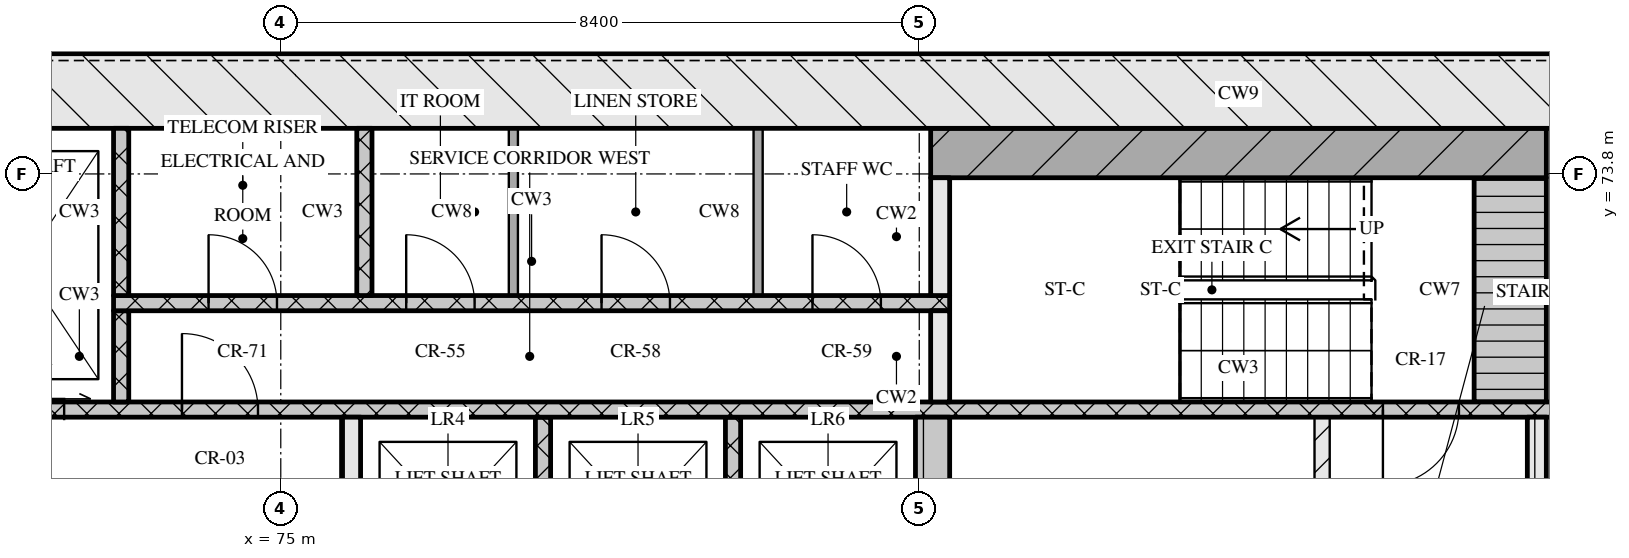
"""IFC4 building model, lengths in metres.
Left out: names, types, materials, properties, quantities, classifications, styles, units other than length and angle.
Written with IfcOpenShell. Run it as: python <this file> out.ifc"""

import sys

from ifc_helpers import new_model, si_unit, direction, frame, frame_2d, origin, place, context, subcontext, project, spatial, rectangle, extrude, element, fill, save


model = new_model("IFC4")
c1 = context("Model", 3, precision=1e-05, world=origin(), true_north=direction((0.0, 1.0)))
c2 = subcontext(c1, "Body", "Model", "MODEL_VIEW")
j1 = project(units=[si_unit("LENGTHUNIT", "METRE"), si_unit("PLANEANGLEUNIT", "RADIAN")], contexts=[c1])
p1 = place(None, origin())
s1 = spatial("IfcSite", under=j1, at=p1, CompositionType="ELEMENT")
p2 = place(p1, origin())
s2 = spatial("IfcBuilding", under=s1, at=p2, CompositionType="ELEMENT")
p3 = place(p2, frame((0.0, 0.0, 138.45)))
s3 = spatial("IfcBuildingStorey", under=s2, at=p3, CompositionType="ELEMENT", Elevation=138.45)
p4 = place(p3, frame((66.8, 74.9, 0.0), z_axis=(0.0, 0.0, 1.0), x_axis=(1.0, 0.0, 0.0)))
e1 = element("IfcWall", 1, at=p4, inside=s3, PredefinedType="SOLIDWALL", context=c2, shape_type="SweptSolid", body=[
    extrude(rectangle(XDim=41.6, YDim=1.0, at=frame_2d((20.8, 0.0))), origin(), (0.0, 0.0, 1.0), 3.3),
])
for number, where, z_axis, x_axis in (
    (2, (78.45, 68.0, 0.0), (0.0, 0.0, 1.0), (0.0, 1.0, 0.0)),
    (3, (80.95, 68.0, 0.0), (0.0, 0.0, 1.0), (0.0, 1.0, 0.0)),
):
    element("IfcWall", number, at=place(p3, frame(where, z_axis=z_axis, x_axis=x_axis)), inside=s3, PredefinedType="SOLIDWALL", context=c2, shape_type="SweptSolid", body=[
        extrude(rectangle(XDim=2.6, YDim=0.2, at=frame_2d((1.3, 0.0))), origin(), (0.0, 0.0, 1.0), 3.3),
    ])
p5 = place(p3, frame((83.575, 68.0, 0.0), z_axis=(0.0, 0.0, 1.0), x_axis=(0.0, 1.0, 0.0)))
e4 = element("IfcWall", 4, at=p5, inside=s3, PredefinedType="SOLIDWALL", context=c2, shape_type="SweptSolid", body=[
    extrude(rectangle(XDim=2.6, YDim=0.45, at=frame_2d((1.3, 0.0))), origin(), (0.0, 0.0, 1.0), 3.3),
])
p6 = place(p3, frame((88.7, 68.0, 0.0), z_axis=(0.0, 0.0, 1.0), x_axis=(0.0, 1.0, 0.0)))
e5 = element("IfcWall", 5, at=p6, inside=s3, PredefinedType="PARTITIONING", context=c2, shape_type="SweptSolid", body=[
    extrude(rectangle(XDim=2.6, YDim=0.2, at=frame_2d((1.3, 0.0))), origin(), (0.0, 0.0, 1.0), 3.3),
])
p7 = place(p3, frame((91.525, 68.0, 0.0), z_axis=(0.0, 0.0, 1.0), x_axis=(0.0, 1.0, 0.0)))
e6 = element("IfcWall", 6, at=p7, inside=s3, PredefinedType="SOLIDWALL", context=c2, shape_type="SweptSolid", body=[
    extrude(rectangle(XDim=2.6, YDim=0.25, at=frame_2d((1.3, 0.0))), origin(), (0.0, 0.0, 1.0), 3.3),
])
p8 = place(p3, frame((75.925, 68.3, 0.0), z_axis=(0.0, 0.0, 1.0), x_axis=(0.0, 1.0, 0.0)))
e7 = element("IfcWall", 7, at=p8, inside=s3, PredefinedType="SOLIDWALL", context=c2, shape_type="SweptSolid", body=[
    extrude(rectangle(XDim=2.3, YDim=0.25, at=frame_2d((1.15, 0.0))), origin(), (0.0, 0.0, 1.0), 3.3),
])
p9 = place(p3, frame((67.8, 70.7, 0.0), z_axis=(0.0, 0.0, 1.0), x_axis=(1.0, 0.0, 0.0)))
e8 = element("IfcWall", 8, at=p9, inside=s3, PredefinedType="SOLIDWALL", context=c2, shape_type="SweptSolid", body=[
    extrude(rectangle(XDim=39.6, YDim=0.2, at=frame_2d((19.8, 0.0))), origin(), (0.0, 0.0, 1.0), 3.3),
])
p10 = place(p9, frame((0.65, 0.0, 0.0)))
e9 = element("IfcOpeningElement", 9, at=p10, cuts=e8, PredefinedType="OPENING", context=c2, shape_type="SweptSolid", body=[
    extrude(rectangle(XDim=1.1, YDim=2.1, at=frame_2d((0.55, 1.05))), frame((0.0, 0.11, 0.0), z_axis=(0.0, -1.0, 0.0), x_axis=(1.0, 0.0, 0.0)), (0.0, 0.0, 1.0), 0.22),
])
p11 = place(p9, frame((3.25, 0.0, 0.0)))
e10 = element("IfcOpeningElement", 10, at=p11, cuts=e8, PredefinedType="OPENING", context=c2, shape_type="SweptSolid", body=[
    extrude(rectangle(XDim=1.1, YDim=2.1, at=frame_2d((0.55, 1.05))), frame((0.0, 0.11, 0.0), z_axis=(0.0, -1.0, 0.0), x_axis=(1.0, 0.0, 0.0)), (0.0, 0.0, 1.0), 0.22),
])
p12 = place(p9, frame((5.9, 0.0, 0.0)))
e11 = element("IfcOpeningElement", 11, at=p12, cuts=e8, PredefinedType="OPENING", context=c2, shape_type="SweptSolid", body=[
    extrude(rectangle(XDim=1.0, YDim=2.1, at=frame_2d((0.5, 1.05))), frame((0.0, 0.11, 0.0), z_axis=(0.0, -1.0, 0.0), x_axis=(1.0, 0.0, 0.0)), (0.0, 0.0, 1.0), 0.22),
])
p13 = place(p9, frame((21.7, 0.0, 0.0)))
e12 = element("IfcOpeningElement", 12, at=p13, cuts=e8, PredefinedType="OPENING", context=c2, shape_type="SweptSolid", body=[
    extrude(rectangle(XDim=1.0, YDim=2.1, at=frame_2d((0.5, 1.05))), frame((0.0, 0.11, 0.0), z_axis=(0.0, -1.0, 0.0), x_axis=(1.0, 0.0, 0.0)), (0.0, 0.0, 1.0), 0.22),
])
p14 = place(p9, frame((32.7, 0.0, 0.0)))
e13 = element("IfcOpeningElement", 13, at=p14, cuts=e8, PredefinedType="OPENING", context=c2, shape_type="SweptSolid", body=[
    extrude(rectangle(XDim=1.0, YDim=2.1, at=frame_2d((0.5, 1.05))), frame((0.0, 0.11, 0.0), z_axis=(0.0, -1.0, 0.0), x_axis=(1.0, 0.0, 0.0)), (0.0, 0.0, 1.0), 0.22),
])
p15 = place(p9, frame((35.25, 0.0, 0.0)))
e14 = element("IfcOpeningElement", 14, at=p15, cuts=e8, PredefinedType="OPENING", context=c2, shape_type="SweptSolid", body=[
    extrude(rectangle(XDim=1.1, YDim=2.1, at=frame_2d((0.55, 1.05))), frame((0.0, 0.11, 0.0), z_axis=(0.0, -1.0, 0.0), x_axis=(1.0, 0.0, 0.0)), (0.0, 0.0, 1.0), 0.22),
])
p16 = place(p9, frame((37.85, 0.0, 0.0)))
e15 = element("IfcOpeningElement", 15, at=p16, cuts=e8, PredefinedType="OPENING", context=c2, shape_type="SweptSolid", body=[
    extrude(rectangle(XDim=1.1, YDim=2.1, at=frame_2d((0.55, 1.05))), frame((0.0, 0.11, 0.0), z_axis=(0.0, -1.0, 0.0), x_axis=(1.0, 0.0, 0.0)), (0.0, 0.0, 1.0), 0.22),
])
p17 = place(p3, frame((72.9, 70.8, 0.0), z_axis=(0.0, 0.0, 1.0), x_axis=(0.0, 1.0, 0.0)))
e16 = element("IfcWall", 16, at=p17, inside=s3, PredefinedType="SOLIDWALL", context=c2, shape_type="SweptSolid", body=[
    extrude(rectangle(XDim=1.2, YDim=0.2, at=frame_2d((0.6, 0.0))), origin(), (0.0, 0.0, 1.0), 3.3),
])
p18 = place(p3, frame((83.675, 70.8, 0.0), z_axis=(0.0, 0.0, 1.0), x_axis=(0.0, 1.0, 0.0)))
e17 = element("IfcWall", 17, at=p18, inside=s3, PredefinedType="SOLIDWALL", context=c2, shape_type="SweptSolid", body=[
    extrude(rectangle(XDim=1.2, YDim=0.25, at=frame_2d((0.6, 0.0))), origin(), (0.0, 0.0, 1.0), 3.3),
])
p19 = place(p3, frame((91.175, 70.8, 0.0), z_axis=(0.0, 0.0, 1.0), x_axis=(0.0, 1.0, 0.0)))
e18 = element("IfcWall", 18, at=p19, inside=s3, PredefinedType="SOLIDWALL", context=c2, shape_type="SweptSolid", body=[
    extrude(rectangle(XDim=2.95, YDim=0.95, at=frame_2d((1.475, 0.0))), origin(), (0.0, 0.0, 1.0), 3.3),
])
p20 = place(p3, frame((72.8, 72.1, 0.0), z_axis=(0.0, 0.0, 1.0), x_axis=(1.0, 0.0, 0.0)))
e19 = element("IfcWall", 19, at=p20, inside=s3, PredefinedType="SOLIDWALL", context=c2, shape_type="SweptSolid", body=[
    extrude(rectangle(XDim=11.0, YDim=0.2, at=frame_2d((5.5, 0.0))), origin(), (0.0, 0.0, 1.0), 3.3),
])
p21 = place(p20, frame((1.25, 0.0, 0.0)))
e20 = element("IfcOpeningElement", 20, at=p21, cuts=e19, PredefinedType="OPENING", context=c2, shape_type="SweptSolid", body=[
    extrude(rectangle(XDim=0.9, YDim=2.1, at=frame_2d((0.45, 1.05))), frame((0.0, 0.11, 0.0), z_axis=(0.0, -1.0, 0.0), x_axis=(1.0, 0.0, 0.0)), (0.0, 0.0, 1.0), 0.22),
])
p22 = place(p20, frame((3.85, 0.0, 0.0)))
e21 = element("IfcOpeningElement", 21, at=p22, cuts=e19, PredefinedType="OPENING", context=c2, shape_type="SweptSolid", body=[
    extrude(rectangle(XDim=0.9, YDim=2.1, at=frame_2d((0.45, 1.05))), frame((0.0, 0.11, 0.0), z_axis=(0.0, -1.0, 0.0), x_axis=(1.0, 0.0, 0.0)), (0.0, 0.0, 1.0), 0.22),
])
p23 = place(p20, frame((6.42, 0.0, 0.0)))
e22 = element("IfcOpeningElement", 22, at=p23, cuts=e19, PredefinedType="OPENING", context=c2, shape_type="SweptSolid", body=[
    extrude(rectangle(XDim=0.9, YDim=2.1, at=frame_2d((0.45, 1.05))), frame((0.0, 0.11, 0.0), z_axis=(0.0, -1.0, 0.0), x_axis=(1.0, 0.0, 0.0)), (0.0, 0.0, 1.0), 0.22),
])
p24 = place(p20, frame((9.195, 0.0, 0.0)))
e23 = element("IfcOpeningElement", 23, at=p24, cuts=e19, PredefinedType="OPENING", context=c2, shape_type="SweptSolid", body=[
    extrude(rectangle(XDim=0.9, YDim=2.1, at=frame_2d((0.45, 1.05))), frame((0.0, 0.11, 0.0), z_axis=(0.0, -1.0, 0.0), x_axis=(1.0, 0.0, 0.0)), (0.0, 0.0, 1.0), 0.22),
])
for number, where, z_axis, x_axis in (
    (24, (72.9, 72.2, 0.0), (0.0, 0.0, 1.0), (0.0, 1.0, 0.0)),
    (25, (76.1, 72.2, 0.0), (0.0, 0.0, 1.0), (0.0, 1.0, 0.0)),
):
    element("IfcWall", number, at=place(p3, frame(where, z_axis=z_axis, x_axis=x_axis)), inside=s3, PredefinedType="SOLIDWALL", context=c2, shape_type="SweptSolid", body=[
        extrude(rectangle(XDim=2.2, YDim=0.2, at=frame_2d((1.1, 0.0))), origin(), (0.0, 0.0, 1.0), 3.3),
    ])
for number, where, z_axis, x_axis in (
    (26, (78.06, 72.2, 0.0), (0.0, 0.0, 1.0), (0.0, 1.0, 0.0)),
    (27, (81.28, 72.2, 0.0), (0.0, 0.0, 1.0), (0.0, 1.0, 0.0)),
):
    element("IfcWall", number, at=place(p3, frame(where, z_axis=z_axis, x_axis=x_axis)), inside=s3, PredefinedType="PARTITIONING", context=c2, shape_type="SweptSolid", body=[
        extrude(rectangle(XDim=2.2, YDim=0.12, at=frame_2d((1.1, 0.0))), origin(), (0.0, 0.0, 1.0), 3.3),
    ])
p25 = place(p3, frame((83.675, 72.2, 0.0), z_axis=(0.0, 0.0, 1.0), x_axis=(0.0, 1.0, 0.0)))
e28 = element("IfcWall", 28, at=p25, inside=s3, PredefinedType="SOLIDWALL", context=c2, shape_type="SweptSolid", body=[
    extrude(rectangle(XDim=1.55, YDim=0.25, at=frame_2d((0.775, 0.0))), origin(), (0.0, 0.0, 1.0), 3.3),
])
p26 = place(p3, frame((83.55, 74.075, 0.0), z_axis=(0.0, 0.0, 1.0), x_axis=(1.0, 0.0, 0.0)))
e29 = element("IfcWall", 29, at=p26, inside=s3, PredefinedType="SOLIDWALL", context=c2, shape_type="SweptSolid", body=[
    extrude(rectangle(XDim=8.1, YDim=0.65, at=frame_2d((4.05, 0.0))), origin(), (0.0, 0.0, 1.0), 3.3),
])
p27 = place(p11, origin())
e30 = element("IfcDoor", 30, at=p27, inside=s3, OperationType="SLIDING_TO_RIGHT", PredefinedType="DOOR", context=c2, shape_type="SweptSolid", body=[
    extrude(rectangle(XDim=1.1, YDim=2.1, at=frame_2d((0.55, 1.05))), frame((0.0, 0.025, 0.0), z_axis=(0.0, -1.0, 0.0), x_axis=(1.0, 0.0, 0.0)), (0.0, 0.0, 1.0), 0.05),
])
fill(e10, e30)
p28 = place(p12, origin())
e31 = element("IfcDoor", 31, at=p28, inside=s3, OperationType="SINGLE_SWING_LEFT", PredefinedType="DOOR", context=c2, shape_type="SweptSolid", body=[
    extrude(rectangle(XDim=1.0, YDim=2.1, at=frame_2d((0.5, 1.05))), frame((0.0, 0.025, 0.0), z_axis=(0.0, -1.0, 0.0), x_axis=(1.0, 0.0, 0.0)), (0.0, 0.0, 1.0), 0.05),
])
fill(e11, e31)
p29 = place(p13, origin())
e32 = element("IfcDoor", 32, at=p29, inside=s3, OperationType="SINGLE_SWING_RIGHT", PredefinedType="DOOR", context=c2, shape_type="SweptSolid", body=[
    extrude(rectangle(XDim=1.0, YDim=2.1, at=frame_2d((0.5, 1.05))), frame((0.0, 0.025, 0.0), z_axis=(0.0, -1.0, 0.0), x_axis=(1.0, 0.0, 0.0)), (0.0, 0.0, 1.0), 0.05),
])
fill(e12, e32)
p30 = place(p21, origin())
e33 = element("IfcDoor", 33, at=p30, inside=s3, OperationType="SINGLE_SWING_LEFT", PredefinedType="DOOR", context=c2, shape_type="SweptSolid", body=[
    extrude(rectangle(XDim=0.9, YDim=2.1, at=frame_2d((0.45, 1.05))), frame((0.0, 0.025, 0.0), z_axis=(0.0, -1.0, 0.0), x_axis=(1.0, 0.0, 0.0)), (0.0, 0.0, 1.0), 0.05),
])
fill(e20, e33)
p31 = place(p22, origin())
e34 = element("IfcDoor", 34, at=p31, inside=s3, OperationType="SINGLE_SWING_LEFT", PredefinedType="DOOR", context=c2, shape_type="SweptSolid", body=[
    extrude(rectangle(XDim=0.9, YDim=2.1, at=frame_2d((0.45, 1.05))), frame((0.0, 0.025, 0.0), z_axis=(0.0, -1.0, 0.0), x_axis=(1.0, 0.0, 0.0)), (0.0, 0.0, 1.0), 0.05),
])
fill(e21, e34)
p32 = place(p23, origin())
e35 = element("IfcDoor", 35, at=p32, inside=s3, OperationType="SINGLE_SWING_LEFT", PredefinedType="DOOR", context=c2, shape_type="SweptSolid", body=[
    extrude(rectangle(XDim=0.9, YDim=2.1, at=frame_2d((0.45, 1.05))), frame((0.0, 0.025, 0.0), z_axis=(0.0, -1.0, 0.0), x_axis=(1.0, 0.0, 0.0)), (0.0, 0.0, 1.0), 0.05),
])
fill(e22, e35)
p33 = place(p24, origin())
e36 = element("IfcDoor", 36, at=p33, inside=s3, OperationType="SINGLE_SWING_LEFT", PredefinedType="DOOR", context=c2, shape_type="SweptSolid", body=[
    extrude(rectangle(XDim=0.9, YDim=2.1, at=frame_2d((0.45, 1.05))), frame((0.0, 0.025, 0.0), z_axis=(0.0, -1.0, 0.0), x_axis=(1.0, 0.0, 0.0)), (0.0, 0.0, 1.0), 0.05),
])
fill(e23, e36)
save(model, sys.argv[1])
